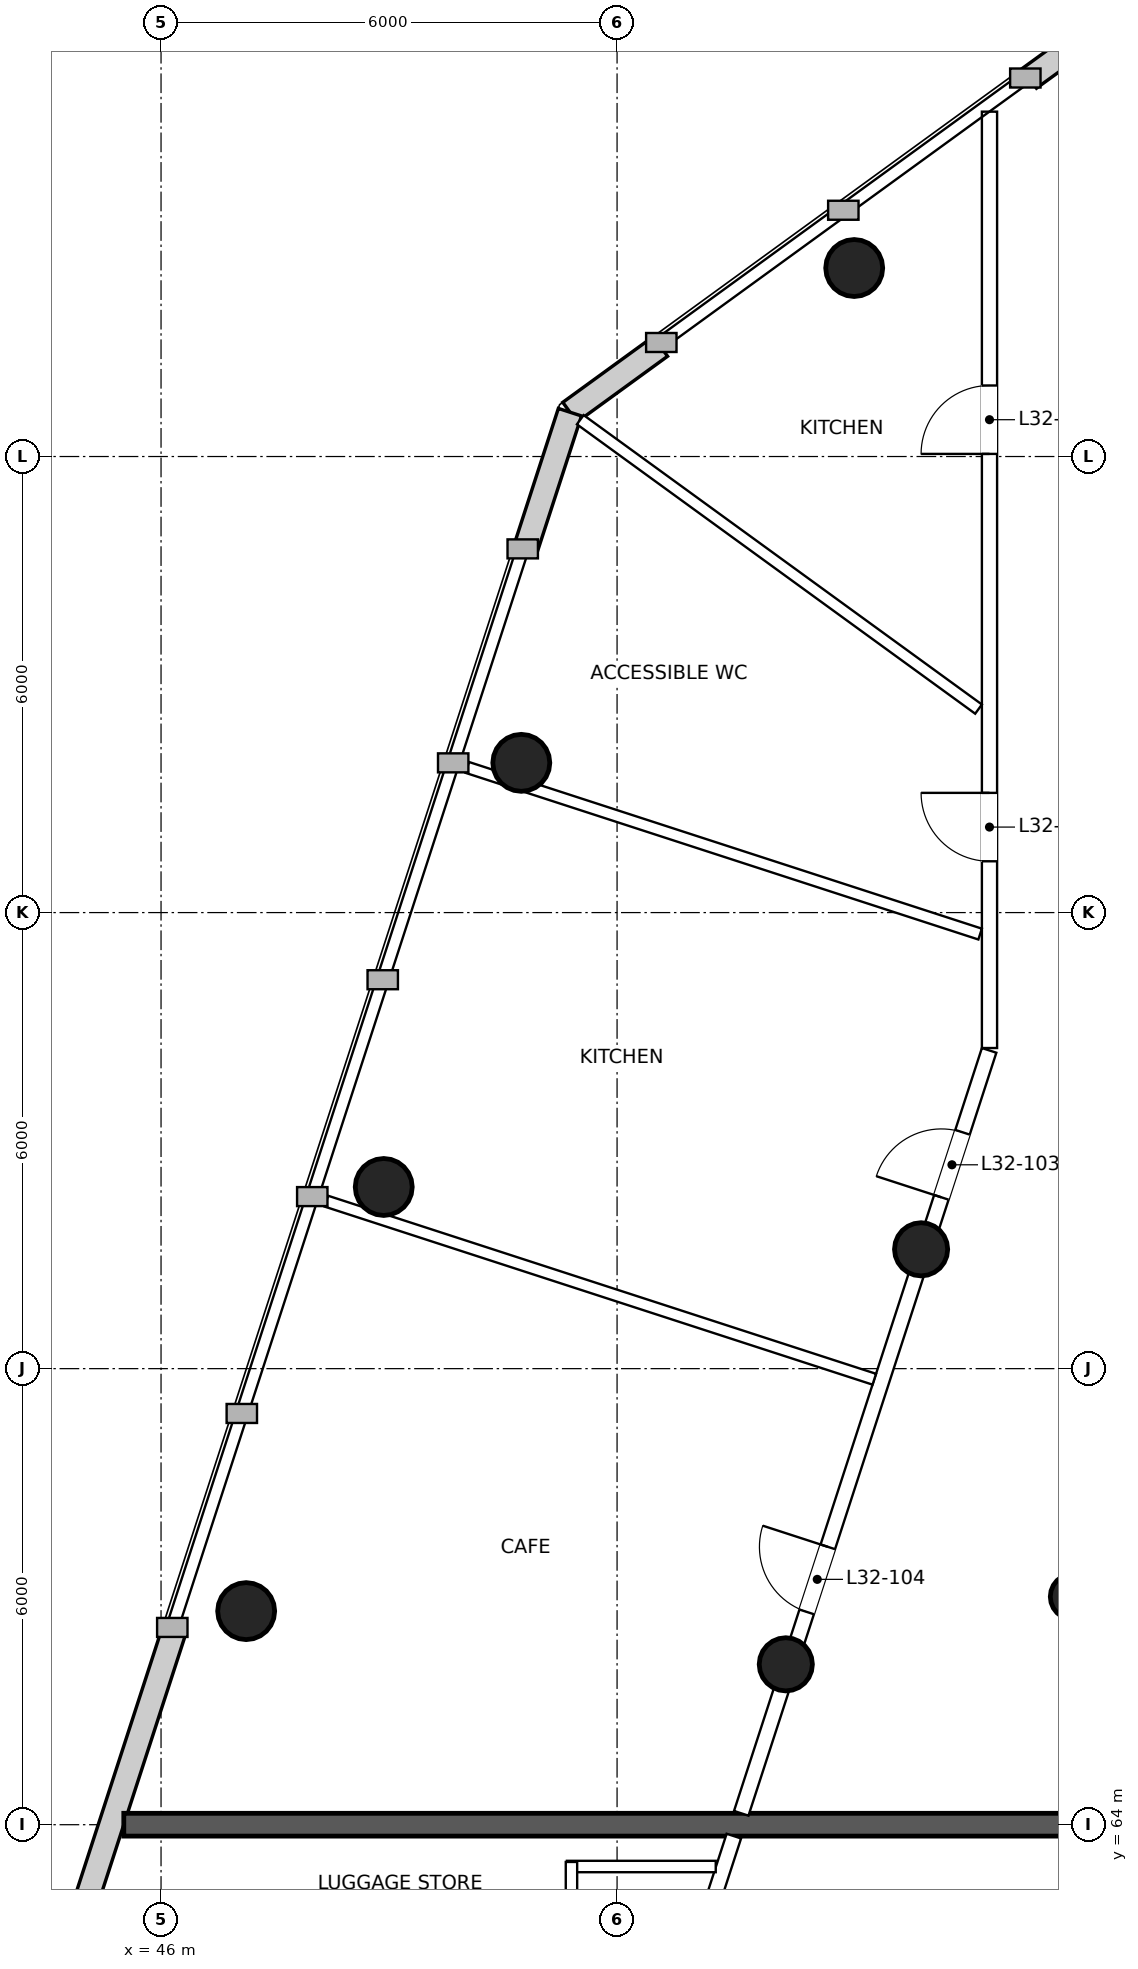
"""IFC4 building model, lengths in metres.
Left out: names, types, materials, properties, quantities, classifications, styles, units other than length and angle.
Written with IfcOpenShell. Run it as: python <this file> out.ifc"""

import sys

from ifc_helpers import new_model, si_unit, direction, frame, frame_2d, origin, origin_2d, place, context, subcontext, project, spatial, rectangle, circle, extrude, element, fill, save


model = new_model("IFC4")
c1 = context("Model", 3, precision=1e-05, world=origin(), true_north=direction((0.0, 1.0)))
c2 = subcontext(c1, "Body", "Model", "MODEL_VIEW")
j1 = project(units=[si_unit("LENGTHUNIT", "METRE"), si_unit("PLANEANGLEUNIT", "RADIAN")], contexts=[c1])
p1 = place(None, origin())
s1 = spatial("IfcSite", under=j1, at=p1, CompositionType="ELEMENT")
p2 = place(p1, origin())
s2 = spatial("IfcBuilding", under=s1, at=p2, CompositionType="ELEMENT")
p3 = place(p2, frame((0.0, 0.0, 142.6)))
s3 = spatial("IfcBuildingStorey", under=s2, at=p3, CompositionType="ELEMENT", Elevation=142.6)
for number, where, z_axis, x_axis in (
    (1, (55.12, 84.48, 0.0), (0.0, 0.0, 1.0), (1.0, 0.0, 0.0)),
    (2, (50.74, 77.97, 0.0), (0.0, 0.0, 1.0), (1.0, 0.0, 0.0)),
    (3, (48.93, 72.39, 0.0), (0.0, 0.0, 1.0), (1.0, 0.0, 0.0)),
    (4, (47.12, 66.81, 0.0), (0.0, 0.0, 1.0), (1.0, 0.0, 0.0)),
):
    element("IfcColumn", number, at=place(p3, frame(where, z_axis=z_axis, x_axis=x_axis)), inside=s3, PredefinedType="COLUMN", context=c2, shape_type="SweptSolid", body=[
        extrude(circle(Radius=0.375, at=origin_2d()), origin(), (0.0, 0.0, 1.0), 6.0),
    ])
for number, where, z_axis, x_axis in (
    (5, (56.0, 71.57, 0.0), (0.0, 0.0, 1.0), (1.0, 0.0, 0.0)),
    (6, (54.22, 66.11, 0.0), (0.0, 0.0, 1.0), (1.0, 0.0, 0.0)),
):
    element("IfcColumn", number, at=place(p3, frame(where, z_axis=z_axis, x_axis=x_axis)), inside=s3, PredefinedType="COLUMN", context=c2, shape_type="SweptSolid", body=[
        extrude(circle(Radius=0.35, at=origin_2d()), origin(), (0.0, 0.0, 1.0), 6.0),
    ])
p4 = place(p3, frame((58.0, 67.0, 0.0), z_axis=(0.0, 0.0, 1.0), x_axis=(1.0, 0.0, 0.0)))
e7 = element("IfcColumn", 7, at=p4, inside=s3, PredefinedType="COLUMN", context=c2, shape_type="SweptSolid", body=[
    extrude(circle(Radius=0.3, at=origin_2d()), origin(), (0.0, 0.0, 1.0), 6.0),
])
for number, where, z_axis, x_axis in (
    (8, (58.615, 87.84, 0.0), (0.0, 0.0, 1.0), (-0.809, -0.588, 0.0)),
    (9, (52.57, 83.448, 0.0), (0.0, 0.0, 1.0), (-0.809, -0.588, 0.0)),
):
    element("IfcWall", number, at=place(p3, frame(where, z_axis=z_axis, x_axis=x_axis)), inside=s3, PredefinedType="SOLIDWALL", context=c2, shape_type="SweptSolid", body=[
        extrude(rectangle(XDim=1.472, YDim=0.32, at=frame_2d((0.736, 0.0))), origin(), (0.0, 0.0, 1.0), 5.7),
    ])
p5 = place(p3, frame((51.38, 82.583, 0.0), z_axis=(0.0, 0.0, 1.0), x_axis=(-0.309020851273, -0.951055263104, 0.0)))
e10 = element("IfcWall", 10, at=p5, inside=s3, PredefinedType="SOLIDWALL", context=c2, shape_type="SweptSolid", body=[
    extrude(rectangle(XDim=1.862, YDim=0.32, at=frame_2d((0.931, 0.0))), origin(), (0.0, 0.0, 1.0), 5.7),
])
p6 = place(p3, frame((46.169, 66.546, 0.0), z_axis=(0.0, 0.0, 1.0), x_axis=(-0.309003189113, -0.951061001786, 0.0)))
e11 = element("IfcWall", 11, at=p6, inside=s3, PredefinedType="SOLIDWALL", context=c2, shape_type="SweptSolid", body=[
    extrude(rectangle(XDim=4.862, YDim=0.32, at=frame_2d((2.431, 0.0))), origin(), (0.0, 0.0, 1.0), 5.7),
])
p7 = place(p3, frame((45.51, 64.0, 0.0), z_axis=(0.0, 0.0, 1.0), x_axis=(1.0, 0.0, 0.0)))
e12 = element("IfcWall", 12, at=p7, inside=s3, PredefinedType="PARTITIONING", context=c2, shape_type="SweptSolid", body=[
    extrude(rectangle(XDim=48.98, YDim=0.3, at=frame_2d((24.49, 0.0))), origin(), (0.0, 0.0, 1.0), 5.0),
])
p8 = place(p7, frame((15.283, 0.0, 0.0)))
e13 = element("IfcOpeningElement", 13, at=p8, cuts=e12, PredefinedType="OPENING", context=c2, shape_type="SweptSolid", body=[
    extrude(rectangle(XDim=2.0, YDim=2.1, at=frame_2d((1.0, 1.05))), frame((0.0, 0.16, 0.0), z_axis=(0.0, -1.0, 0.0), x_axis=(1.0, 0.0, 0.0)), (0.0, 0.0, 1.0), 0.32),
])
p9 = place(p7, frame((31.698, 0.0, 0.0)))
e14 = element("IfcOpeningElement", 14, at=p9, cuts=e12, PredefinedType="OPENING", context=c2, shape_type="SweptSolid", body=[
    extrude(rectangle(XDim=2.0, YDim=2.1, at=frame_2d((1.0, 1.05))), frame((0.0, 0.16, 0.0), z_axis=(0.0, -1.0, 0.0), x_axis=(1.0, 0.0, 0.0)), (0.0, 0.0, 1.0), 0.32),
])
p10 = place(p3, frame((56.9, 74.218, 0.0), z_axis=(0.0, 0.0, 1.0), x_axis=(0.0, 1.0, 0.0)))
e15 = element("IfcWall", 15, at=p10, inside=s3, PredefinedType="PARTITIONING", context=c2, shape_type="SweptSolid", body=[
    extrude(rectangle(XDim=12.319, YDim=0.2, at=frame_2d((6.16, 0.0))), origin(), (0.0, 0.0, 1.0), 5.25),
])
p11 = place(p10, frame((7.816, 0.0, 0.0)))
e16 = element("IfcOpeningElement", 16, at=p11, cuts=e15, PredefinedType="OPENING", context=c2, shape_type="SweptSolid", body=[
    extrude(rectangle(XDim=0.9, YDim=2.1, at=frame_2d((0.45, 1.05))), frame((0.0, 0.11, 0.0), z_axis=(0.0, -1.0, 0.0), x_axis=(1.0, 0.0, 0.0)), (0.0, 0.0, 1.0), 0.22),
])
p12 = place(p10, frame((2.457, 0.0, 0.0)))
e17 = element("IfcOpeningElement", 17, at=p12, cuts=e15, PredefinedType="OPENING", context=c2, shape_type="SweptSolid", body=[
    extrude(rectangle(XDim=0.9, YDim=2.1, at=frame_2d((0.45, 1.05))), frame((0.0, 0.11, 0.0), z_axis=(0.0, -1.0, 0.0), x_axis=(1.0, 0.0, 0.0)), (0.0, 0.0, 1.0), 0.22),
])
p13 = place(p3, frame((52.929, 61.981, 0.0), z_axis=(0.0, 0.0, 1.0), x_axis=(0.308951238916, 0.951077879026, 0.0)))
e18 = element("IfcWall", 18, at=p13, inside=s3, PredefinedType="PARTITIONING", context=c2, shape_type="SweptSolid", body=[
    extrude(rectangle(XDim=1.965, YDim=0.2, at=frame_2d((0.983, 0.0))), origin(), (0.0, 0.0, 1.0), 5.7),
])
p14 = place(p3, frame((53.634, 64.15, 0.0), z_axis=(0.0, 0.0, 1.0), x_axis=(0.309008133723, 0.95105939525, 0.0)))
e19 = element("IfcWall", 19, at=p14, inside=s3, PredefinedType="PARTITIONING", context=c2, shape_type="SweptSolid", body=[
    extrude(rectangle(XDim=10.554, YDim=0.2, at=frame_2d((5.277, 0.0))), origin(), (0.0, 0.0, 1.0), 5.15),
])
p15 = place(p14, frame((8.521, 0.0, 0.0)))
e20 = element("IfcOpeningElement", 20, at=p15, cuts=e19, PredefinedType="OPENING", context=c2, shape_type="SweptSolid", body=[
    extrude(rectangle(XDim=0.9, YDim=2.1, at=frame_2d((0.45, 1.05))), frame((0.0, 0.11, 0.0), z_axis=(0.0, -1.0, 0.0), x_axis=(1.0, 0.0, 0.0)), (0.0, 0.0, 1.0), 0.22),
])
p16 = place(p14, frame((2.786, 0.0, 0.0)))
e21 = element("IfcOpeningElement", 21, at=p16, cuts=e19, PredefinedType="OPENING", context=c2, shape_type="SweptSolid", body=[
    extrude(rectangle(XDim=0.9, YDim=2.1, at=frame_2d((0.45, 1.05))), frame((0.0, 0.11, 0.0), z_axis=(0.0, -1.0, 0.0), x_axis=(1.0, 0.0, 0.0)), (0.0, 0.0, 1.0), 0.22),
])
p17 = place(p3, frame((51.516, 82.484, 0.0), z_axis=(0.0, 0.0, 1.0), x_axis=(0.80901309186, -0.587790623606, 0.0)))
e22 = element("IfcWall", 22, at=p17, inside=s3, PredefinedType="PARTITIONING", context=c2, shape_type="SweptSolid", body=[
    extrude(rectangle(XDim=6.477, YDim=0.15, at=frame_2d((3.239, 0.0))), origin(), (0.0, 0.0, 1.0), 5.25),
])
p18 = place(p3, frame((50.029, 77.91, 0.0), z_axis=(0.0, 0.0, 1.0), x_axis=(0.951057836712, -0.309012930519, 0.0)))
e23 = element("IfcWall", 23, at=p18, inside=s3, PredefinedType="PARTITIONING", context=c2, shape_type="SweptSolid", body=[
    extrude(rectangle(XDim=7.095, YDim=0.15, at=frame_2d((3.547, 0.0))), origin(), (0.0, 0.0, 1.0), 5.7),
])
p19 = place(p3, frame((48.175, 72.203, 0.0), z_axis=(0.0, 0.0, 1.0), x_axis=(0.951058681979, -0.309010329007, 0.0)))
e24 = element("IfcWall", 24, at=p19, inside=s3, PredefinedType="PARTITIONING", context=c2, shape_type="SweptSolid", body=[
    extrude(rectangle(XDim=7.58, YDim=0.15, at=frame_2d((3.79, 0.0))), origin(), (0.0, 0.0, 1.0), 5.15),
])
p20 = place(p3, frame((53.298, 63.45, 0.0), z_axis=(0.0, 0.0, 1.0), x_axis=(-1.0, 0.0, 0.0)))
e25 = element("IfcWall", 25, at=p20, inside=s3, PredefinedType="PARTITIONING", context=c2, shape_type="SweptSolid", body=[
    extrude(rectangle(XDim=1.958, YDim=0.15, at=frame_2d((0.979, 0.0))), origin(), (0.0, 0.0, 1.0), 5.7),
])
p21 = place(p3, frame((51.4, 63.51, 0.0), z_axis=(0.0, 0.0, 1.0), x_axis=(0.0, -1.0, 0.0)))
e26 = element("IfcWall", 26, at=p21, inside=s3, PredefinedType="PARTITIONING", context=c2, shape_type="SweptSolid", body=[
    extrude(rectangle(XDim=1.513, YDim=0.15, at=frame_2d((0.756, 0.0))), origin(), (0.0, 0.0, 1.0), 5.7),
])
p22 = place(p11, origin())
e27 = element("IfcDoor", 27, at=p22, inside=s3, OperationType="SINGLE_SWING_LEFT", PredefinedType="DOOR", context=c2, shape_type="SweptSolid", body=[
    extrude(rectangle(XDim=0.9, YDim=2.1, at=frame_2d((0.45, 1.05))), frame((0.0, 0.025, 0.0), z_axis=(0.0, -1.0, 0.0), x_axis=(1.0, 0.0, 0.0)), (0.0, 0.0, 1.0), 0.05),
])
fill(e16, e27)
p23 = place(p12, origin())
e28 = element("IfcDoor", 28, at=p23, inside=s3, OperationType="SINGLE_SWING_RIGHT", PredefinedType="DOOR", context=c2, shape_type="SweptSolid", body=[
    extrude(rectangle(XDim=0.9, YDim=2.1, at=frame_2d((0.45, 1.05))), frame((0.0, 0.025, 0.0), z_axis=(0.0, -1.0, 0.0), x_axis=(1.0, 0.0, 0.0)), (0.0, 0.0, 1.0), 0.05),
])
fill(e17, e28)
p24 = place(p15, origin())
e29 = element("IfcDoor", 29, at=p24, inside=s3, OperationType="SINGLE_SWING_LEFT", PredefinedType="DOOR", context=c2, shape_type="SweptSolid", body=[
    extrude(rectangle(XDim=0.9, YDim=2.1, at=frame_2d((0.45, 1.05))), frame((0.0, 0.025, 0.0), z_axis=(0.0, -1.0, 0.0), x_axis=(1.0, 0.0, 0.0)), (0.0, 0.0, 1.0), 0.05),
])
fill(e20, e29)
p25 = place(p16, origin())
e30 = element("IfcDoor", 30, at=p25, inside=s3, OperationType="SINGLE_SWING_RIGHT", PredefinedType="DOOR", context=c2, shape_type="SweptSolid", body=[
    extrude(rectangle(XDim=0.9, YDim=2.1, at=frame_2d((0.45, 1.05))), frame((0.0, 0.025, 0.0), z_axis=(0.0, -1.0, 0.0), x_axis=(1.0, 0.0, 0.0)), (0.0, 0.0, 1.0), 0.05),
])
fill(e21, e30)
save(model, sys.argv[1])
